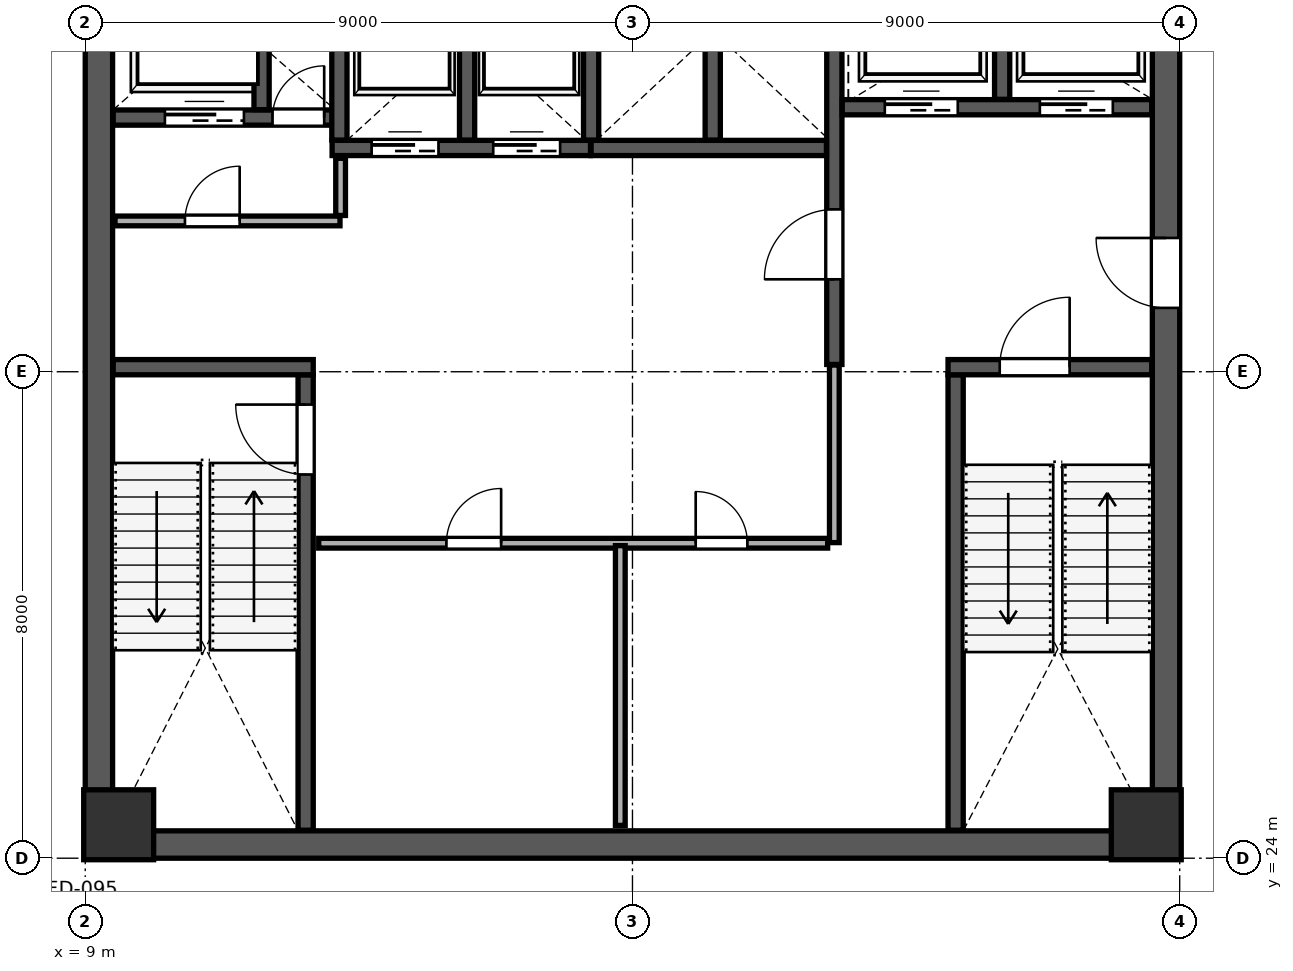
"""IFC4 building model, lengths in metres.
Left out: names, types, materials, properties, quantities, classifications, styles, units other than length and angle.
Written with IfcOpenShell. Run it as: python <this file> out.ifc"""

import sys

from ifc_helpers import new_model, si_unit, direction, frame, frame_2d, origin, origin_2d, place, context, subcontext, project, spatial, rectangle, extrude, source, transform, mapped, element, fill, save


model = new_model("IFC4")
c1 = context("Model", 3, precision=1e-05, world=origin(), true_north=direction((0.0, 1.0)))
c2 = subcontext(c1, "Body", "Model", "MODEL_VIEW")
j1 = project(units=[si_unit("LENGTHUNIT", "METRE"), si_unit("PLANEANGLEUNIT", "RADIAN")], contexts=[c1])
p1 = place(None, origin())
s1 = spatial("IfcSite", under=j1, at=p1, CompositionType="ELEMENT")
p2 = place(p1, origin())
s2 = spatial("IfcBuilding", under=s1, at=p2, CompositionType="ELEMENT")
p3 = place(p2, frame((0.0, 0.0, 162.4)))
s3 = spatial("IfcBuildingStorey", under=s2, at=p3, CompositionType="ELEMENT", Elevation=162.4)
m1 = source(origin(), c2, "Body", "SweptSolid", [
    extrude(rectangle(XDim=1.15, YDim=1.15, at=origin_2d()), origin(), (0.0, 0.0, 1.0), 4.199),
])
for number, where, z_axis, x_axis in (
    (1, (9.55, 24.55, 0.001), (0.0, 0.0, 1.0), (1.0, 0.0, 0.0)),
    (2, (26.45, 24.55, 0.001), (0.0, 0.0, 1.0), (1.0, 0.0, 0.0)),
):
    element("IfcColumn", number, at=place(p3, frame(where, z_axis=z_axis, x_axis=x_axis)), inside=s3, PredefinedType="COLUMN", context=c2, shape_type="MappedRepresentation", body=[
        mapped(m1, transform((0.0, 0.0, 0.0), scale=1.0)),
    ])
p4 = place(p3, frame((9.225, 24.45, 0.0), z_axis=(0.0, 0.0, 1.0), x_axis=(0.0, 1.0, 0.0)))
e3 = element("IfcWall", 3, at=p4, inside=s3, PredefinedType="SHEAR", context=c2, shape_type="SweptSolid", body=[
    extrude(rectangle(XDim=15.1, YDim=0.45, at=frame_2d((7.55, 0.0))), origin(), (0.0, 0.0, 1.0), 3.96),
])
p5 = place(p3, frame((26.775, 24.45, 0.0), z_axis=(0.0, 0.0, 1.0), x_axis=(0.0, 1.0, 0.0)))
e4 = element("IfcWall", 4, at=p5, inside=s3, PredefinedType="SHEAR", context=c2, shape_type="SweptSolid", body=[
    extrude(rectangle(XDim=15.1, YDim=0.45, at=frame_2d((7.55, 0.0))), origin(), (0.0, 0.0, 1.0), 3.96),
])
p6 = place(p5, frame((8.6, 0.0, 0.0)))
e5 = element("IfcOpeningElement", 5, at=p6, cuts=e4, PredefinedType="OPENING", context=c2, shape_type="SweptSolid", body=[
    extrude(rectangle(XDim=1.15, YDim=2.2, at=frame_2d((0.575, 1.1))), frame((0.0, 0.235, 0.0), z_axis=(0.0, -1.0, 0.0), x_axis=(1.0, 0.0, 0.0)), (0.0, 0.0, 1.0), 0.47),
])
p7 = place(p3, frame((9.0, 24.225, 0.0), z_axis=(0.0, 0.0, 1.0), x_axis=(1.0, 0.0, 0.0)))
e6 = element("IfcWall", 6, at=p7, inside=s3, PredefinedType="SHEAR", context=c2, shape_type="SweptSolid", body=[
    extrude(rectangle(XDim=18.0, YDim=0.45, at=frame_2d((9.0, 0.0))), origin(), (0.0, 0.0, 1.0), 3.96),
])
p8 = place(p3, frame((12.625, 24.46, 0.0), z_axis=(0.0, 0.0, 1.0), x_axis=(0.0, 1.0, 0.0)))
e7 = element("IfcWall", 7, at=p8, inside=s3, PredefinedType="SHEAR", context=c2, shape_type="SweptSolid", body=[
    extrude(rectangle(XDim=7.49, YDim=0.25, at=frame_2d((3.745, 0.0))), origin(), (0.0, 0.0, 1.0), 3.96),
])
p9 = place(p8, frame((5.85, 0.0, 0.0)))
e8 = element("IfcOpeningElement", 8, at=p9, cuts=e7, PredefinedType="OPENING", context=c2, shape_type="SweptSolid", body=[
    extrude(rectangle(XDim=1.15, YDim=2.2, at=frame_2d((0.575, 1.1))), frame((0.0, 0.135, 0.0), z_axis=(0.0, -1.0, 0.0), x_axis=(1.0, 0.0, 0.0)), (0.0, 0.0, 1.0), 0.27),
])
p10 = place(p3, frame((9.46, 32.075, 0.0), z_axis=(0.0, 0.0, 1.0), x_axis=(1.0, 0.0, 0.0)))
e9 = element("IfcWall", 9, at=p10, inside=s3, PredefinedType="SHEAR", context=c2, shape_type="SweptSolid", body=[
    extrude(rectangle(XDim=3.29, YDim=0.25, at=frame_2d((1.645, 0.0))), origin(), (0.0, 0.0, 1.0), 3.96),
])
p11 = place(p3, frame((23.315, 24.46, 0.0), z_axis=(0.0, 0.0, 1.0), x_axis=(0.0, 1.0, 0.0)))
e10 = element("IfcWall", 10, at=p11, inside=s3, PredefinedType="SHEAR", context=c2, shape_type="SweptSolid", body=[
    extrude(rectangle(XDim=7.49, YDim=0.25, at=frame_2d((3.745, 0.0))), origin(), (0.0, 0.0, 1.0), 3.96),
])
p12 = place(p3, frame((23.19, 32.075, 0.0), z_axis=(0.0, 0.0, 1.0), x_axis=(1.0, 0.0, 0.0)))
e11 = element("IfcWall", 11, at=p12, inside=s3, PredefinedType="SHEAR", context=c2, shape_type="SweptSolid", body=[
    extrude(rectangle(XDim=3.35, YDim=0.25, at=frame_2d((1.675, 0.0))), origin(), (0.0, 0.0, 1.0), 3.96),
])
p13 = place(p12, frame((0.85, 0.0, 0.0)))
e12 = element("IfcOpeningElement", 12, at=p13, cuts=e11, PredefinedType="OPENING", context=c2, shape_type="SweptSolid", body=[
    extrude(rectangle(XDim=1.15, YDim=2.2, at=frame_2d((0.575, 1.1))), frame((0.0, 0.135, 0.0), z_axis=(0.0, -1.0, 0.0), x_axis=(1.0, 0.0, 0.0)), (0.0, 0.0, 1.0), 0.27),
])
p14 = place(p3, frame((21.32, 32.12, 0.0), z_axis=(0.0, 0.0, 1.0), x_axis=(0.0, 1.0, 0.0)))
e13 = element("IfcWall", 13, at=p14, inside=s3, PredefinedType="SHEAR", context=c2, shape_type="SweptSolid", body=[
    extrude(rectangle(XDim=7.42, YDim=0.25, at=frame_2d((3.71, 0.0))), origin(), (0.0, 0.0, 1.0), 3.96),
])
p15 = place(p14, frame((1.4, 0.0, 0.0)))
e14 = element("IfcOpeningElement", 14, at=p15, cuts=e13, PredefinedType="OPENING", context=c2, shape_type="SweptSolid", body=[
    extrude(rectangle(XDim=1.15, YDim=2.2, at=frame_2d((0.575, 1.1))), frame((0.0, 0.135, 0.0), z_axis=(0.0, -1.0, 0.0), x_axis=(1.0, 0.0, 0.0)), (0.0, 0.0, 1.0), 0.27),
])
p16 = place(p3, frame((9.46, 36.18, 0.0), z_axis=(0.0, 0.0, 1.0), x_axis=(1.0, 0.0, 0.0)))
e15 = element("IfcWall", 15, at=p16, inside=s3, PredefinedType="SHEAR", context=c2, shape_type="SweptSolid", body=[
    extrude(rectangle(XDim=3.79, YDim=0.25, at=frame_2d((1.895, 0.0))), origin(), (0.0, 0.0, 1.0), 3.96),
])
p17 = place(p16, frame((2.62, 0.0, 0.0)))
e16 = element("IfcOpeningElement", 16, at=p17, cuts=e15, PredefinedType="OPENING", context=c2, shape_type="SweptSolid", body=[
    extrude(rectangle(XDim=0.85, YDim=2.1, at=frame_2d((0.425, 1.05))), frame((0.0, 0.135, 0.0), z_axis=(0.0, -1.0, 0.0), x_axis=(1.0, 0.0, 0.0)), (0.0, 0.0, 1.0), 0.27),
])
p18 = place(p16, frame((0.85, 0.0, 0.0)))
e17 = element("IfcOpeningElement", 17, at=p18, cuts=e15, PredefinedType="OPENING", context=c2, shape_type="SweptSolid", body=[
    extrude(rectangle(XDim=1.3, YDim=2.25, at=frame_2d((0.65, 1.125))), frame((0.0, 0.135, 0.0), z_axis=(0.0, -1.0, 0.0), x_axis=(1.0, 0.0, 0.0)), (0.0, 0.0, 1.0), 0.27),
])
p19 = place(p3, frame((11.9, 36.31, 0.0), z_axis=(0.0, 0.0, 1.0), x_axis=(0.0, 1.0, 0.0)))
e18 = element("IfcWall", 18, at=p19, inside=s3, PredefinedType="SHEAR", context=c2, shape_type="SweptSolid", body=[
    extrude(rectangle(XDim=3.23, YDim=0.25, at=frame_2d((1.615, 0.0))), origin(), (0.0, 0.0, 1.0), 3.96),
])
p20 = place(p3, frame((21.45, 36.35, 0.0), z_axis=(0.0, 0.0, 1.0), x_axis=(1.0, 0.0, 0.0)))
e19 = element("IfcWall", 19, at=p20, inside=s3, PredefinedType="SHEAR", context=c2, shape_type="SweptSolid", body=[
    extrude(rectangle(XDim=5.09, YDim=0.25, at=frame_2d((2.545, 0.0))), origin(), (0.0, 0.0, 1.0), 3.96),
])
p21 = place(p20, frame((0.7, 0.0, 0.0)))
e20 = element("IfcOpeningElement", 20, at=p21, cuts=e19, PredefinedType="OPENING", context=c2, shape_type="SweptSolid", body=[
    extrude(rectangle(XDim=1.2, YDim=2.2, at=frame_2d((0.6, 1.1))), frame((0.0, 0.135, 0.0), z_axis=(0.0, -1.0, 0.0), x_axis=(1.0, 0.0, 0.0)), (0.0, 0.0, 1.0), 0.27),
])
p22 = place(p20, frame((3.25, 0.0, 0.0)))
e21 = element("IfcOpeningElement", 21, at=p22, cuts=e19, PredefinedType="OPENING", context=c2, shape_type="SweptSolid", body=[
    extrude(rectangle(XDim=1.2, YDim=2.2, at=frame_2d((0.6, 1.1))), frame((0.0, 0.135, 0.0), z_axis=(0.0, -1.0, 0.0), x_axis=(1.0, 0.0, 0.0)), (0.0, 0.0, 1.0), 0.27),
])
p23 = place(p3, frame((24.08, 36.48, 0.0), z_axis=(0.0, 0.0, 1.0), x_axis=(0.0, 1.0, 0.0)))
e22 = element("IfcWall", 22, at=p23, inside=s3, PredefinedType="SHEAR", context=c2, shape_type="SweptSolid", body=[
    extrude(rectangle(XDim=3.06, YDim=0.25, at=frame_2d((1.53, 0.0))), origin(), (0.0, 0.0, 1.0), 3.96),
])
p24 = place(p3, frame((13.06, 35.68, 0.0), z_axis=(0.0, 0.0, 1.0), x_axis=(1.0, 0.0, 0.0)))
e23 = element("IfcWall", 23, at=p24, inside=s3, PredefinedType="SHEAR", context=c2, shape_type="SweptSolid", body=[
    extrude(rectangle(XDim=4.25, YDim=0.25, at=frame_2d((2.125, 0.0))), origin(), (0.0, 0.0, 1.0), 3.96),
])
p25 = place(p24, frame((0.65, 0.0, 0.0)))
e24 = element("IfcOpeningElement", 24, at=p25, cuts=e23, PredefinedType="OPENING", context=c2, shape_type="SweptSolid", body=[
    extrude(rectangle(XDim=1.1, YDim=2.2, at=frame_2d((0.55, 1.1))), frame((0.0, 0.135, 0.0), z_axis=(0.0, -1.0, 0.0), x_axis=(1.0, 0.0, 0.0)), (0.0, 0.0, 1.0), 0.27),
])
p26 = place(p24, frame((2.65, 0.0, 0.0)))
e25 = element("IfcOpeningElement", 25, at=p26, cuts=e23, PredefinedType="OPENING", context=c2, shape_type="SweptSolid", body=[
    extrude(rectangle(XDim=1.1, YDim=2.2, at=frame_2d((0.55, 1.1))), frame((0.0, 0.135, 0.0), z_axis=(0.0, -1.0, 0.0), x_axis=(1.0, 0.0, 0.0)), (0.0, 0.0, 1.0), 0.27),
])
for number, where, z_axis, x_axis in (
    (26, (13.18, 35.81, 0.0), (0.0, 0.0, 1.0), (0.0, 1.0, 0.0)),
    (27, (15.28, 35.81, 0.0), (0.0, 0.0, 1.0), (0.0, 1.0, 0.0)),
):
    element("IfcWall", number, at=place(p3, frame(where, z_axis=z_axis, x_axis=x_axis)), inside=s3, PredefinedType="SHEAR", context=c2, shape_type="SweptSolid", body=[
        extrude(rectangle(XDim=3.73, YDim=0.25, at=frame_2d((1.865, 0.0))), origin(), (0.0, 0.0, 1.0), 3.96),
    ])
p27 = place(p3, frame((17.32, 35.68, 0.0), z_axis=(0.0, 0.0, 1.0), x_axis=(1.0, 0.0, 0.0)))
e28 = element("IfcWall", 28, at=p27, inside=s3, PredefinedType="SHEAR", context=c2, shape_type="SweptSolid", body=[
    extrude(rectangle(XDim=3.87, YDim=0.25, at=frame_2d((1.935, 0.0))), origin(), (0.0, 0.0, 1.0), 3.96),
])
for number, where, z_axis, x_axis in (
    (29, (17.32, 35.81, 0.0), (0.0, 0.0, 1.0), (0.0, 1.0, 0.0)),
    (30, (19.32, 35.81, 0.0), (0.0, 0.0, 1.0), (0.0, 1.0, 0.0)),
):
    element("IfcWall", number, at=place(p3, frame(where, z_axis=z_axis, x_axis=x_axis)), inside=s3, PredefinedType="SHEAR", context=c2, shape_type="SweptSolid", body=[
        extrude(rectangle(XDim=3.73, YDim=0.25, at=frame_2d((1.865, 0.0))), origin(), (0.0, 0.0, 1.0), 3.96),
    ])
p28 = place(p3, frame((9.49, 34.48, 0.0), z_axis=(0.0, 0.0, 1.0), x_axis=(1.0, 0.0, 0.0)))
e31 = element("IfcWall", 31, at=p28, inside=s3, PredefinedType="PARTITIONING", context=c2, shape_type="SweptSolid", body=[
    extrude(rectangle(XDim=3.7, YDim=0.16, at=frame_2d((1.85, 0.0))), origin(), (0.0, 0.0, 1.0), 3.96),
])
p29 = place(p28, frame((1.15, 0.0, 0.0)))
e32 = element("IfcOpeningElement", 32, at=p29, cuts=e31, PredefinedType="OPENING", context=c2, shape_type="SweptSolid", body=[
    extrude(rectangle(XDim=0.9, YDim=2.15, at=frame_2d((0.45, 1.075))), frame((0.0, 0.09, 0.0), z_axis=(0.0, -1.0, 0.0), x_axis=(1.0, 0.0, 0.0)), (0.0, 0.0, 1.0), 0.18),
])
p30 = place(p3, frame((13.2, 34.57, 0.0), z_axis=(0.0, 0.0, 1.0), x_axis=(0.0, 1.0, 0.0)))
e33 = element("IfcWall", 33, at=p30, inside=s3, PredefinedType="PARTITIONING", context=c2, shape_type="SweptSolid", body=[
    extrude(rectangle(XDim=0.94, YDim=0.16, at=frame_2d((0.47, 0.0))), origin(), (0.0, 0.0, 1.0), 3.96),
])
p31 = place(p3, frame((12.84, 29.18, 0.0), z_axis=(0.0, 0.0, 1.0), x_axis=(1.0, 0.0, 0.0)))
e34 = element("IfcWall", 34, at=p31, inside=s3, PredefinedType="PARTITIONING", context=c2, shape_type="SweptSolid", body=[
    extrude(rectangle(XDim=8.37, YDim=0.16, at=frame_2d((4.185, 0.0))), origin(), (0.0, 0.0, 1.0), 3.96),
])
p32 = place(p31, frame((2.1, 0.0, 0.0)))
e35 = element("IfcOpeningElement", 35, at=p32, cuts=e34, PredefinedType="OPENING", context=c2, shape_type="SweptSolid", body=[
    extrude(rectangle(XDim=0.9, YDim=2.15, at=frame_2d((0.45, 1.075))), frame((0.0, 0.09, 0.0), z_axis=(0.0, -1.0, 0.0), x_axis=(1.0, 0.0, 0.0)), (0.0, 0.0, 1.0), 0.18),
])
p33 = place(p31, frame((6.2, 0.0, 0.0)))
e36 = element("IfcOpeningElement", 36, at=p33, cuts=e34, PredefinedType="OPENING", context=c2, shape_type="SweptSolid", body=[
    extrude(rectangle(XDim=0.85, YDim=2.1, at=frame_2d((0.425, 1.05))), frame((0.0, 0.09, 0.0), z_axis=(0.0, -1.0, 0.0), x_axis=(1.0, 0.0, 0.0)), (0.0, 0.0, 1.0), 0.18),
])
p34 = place(p3, frame((17.8, 24.54, 0.0), z_axis=(0.0, 0.0, 1.0), x_axis=(0.0, 1.0, 0.0)))
e37 = element("IfcWall", 37, at=p34, inside=s3, PredefinedType="PARTITIONING", context=c2, shape_type="SweptSolid", body=[
    extrude(rectangle(XDim=4.6, YDim=0.16, at=frame_2d((2.3, 0.0))), origin(), (0.0, 0.0, 1.0), 3.96),
])
p35 = place(p3, frame((21.32, 29.19, 0.0), z_axis=(0.0, 0.0, 1.0), x_axis=(0.0, 1.0, 0.0)))
e38 = element("IfcWall", 38, at=p35, inside=s3, PredefinedType="PARTITIONING", context=c2, shape_type="SweptSolid", body=[
    extrude(rectangle(XDim=2.92, YDim=0.16, at=frame_2d((1.46, 0.0))), origin(), (0.0, 0.0, 1.0), 3.96),
])
p36 = place(p3, frame((7.213, 23.391, 0.0), z_axis=(0.0, 0.0, 1.0), x_axis=(0.906304602938, -0.422625089996, 0.0)))
e39 = element("IfcWall", 39, at=p36, inside=s3, PredefinedType="PARTITIONING", context=c2, shape_type="SweptSolid", body=[
    extrude(rectangle(XDim=19.61, YDim=0.16, at=frame_2d((9.805, 0.0))), origin(), (0.0, 0.0, 1.0), 3.96),
])
p37 = place(p36, frame((1.45, 0.0, 0.0)))
e40 = element("IfcOpeningElement", 40, at=p37, cuts=e39, PredefinedType="OPENING", context=c2, shape_type="SweptSolid", body=[
    extrude(rectangle(XDim=0.95, YDim=2.15, at=frame_2d((0.475, 1.075))), frame((0.0, 0.09, 0.0), z_axis=(0.0, -1.0, 0.0), x_axis=(1.0, 0.0, 0.0)), (0.0, 0.0, 1.0), 0.18),
])
p38 = place(p36, frame((8.7, 0.0, 0.0)))
e41 = element("IfcOpeningElement", 41, at=p38, cuts=e39, PredefinedType="OPENING", context=c2, shape_type="SweptSolid", body=[
    extrude(rectangle(XDim=0.95, YDim=2.15, at=frame_2d((0.475, 1.075))), frame((0.0, 0.09, 0.0), z_axis=(0.0, -1.0, 0.0), x_axis=(1.0, 0.0, 0.0)), (0.0, 0.0, 1.0), 0.18),
])
p39 = place(p3, frame((1.756, 27.635, 0.0), z_axis=(0.0, 0.0, 1.0), x_axis=(0.422615732035, 0.906308966653, 0.0)))
e42 = element("IfcWall", 42, at=p39, inside=s3, PredefinedType="PARTITIONING", context=c2, shape_type="SweptSolid", body=[
    extrude(rectangle(XDim=23.34, YDim=0.135, at=frame_2d((11.67, 0.0))), origin(), (0.0, 0.0, 1.0), 3.96),
])
p40 = place(p39, frame((1.7, 0.0, 0.0)))
e43 = element("IfcOpeningElement", 43, at=p40, cuts=e42, PredefinedType="OPENING", context=c2, shape_type="SweptSolid", body=[
    extrude(rectangle(XDim=0.95, YDim=2.15, at=frame_2d((0.475, 1.075))), frame((0.0, 0.078, 0.0), z_axis=(0.0, -1.0, 0.0), x_axis=(1.0, 0.0, 0.0)), (0.0, 0.0, 1.0), 0.155),
])
p41 = place(p39, frame((9.8, 0.0, 0.0)))
e44 = element("IfcOpeningElement", 44, at=p41, cuts=e42, PredefinedType="OPENING", context=c2, shape_type="SweptSolid", body=[
    extrude(rectangle(XDim=0.95, YDim=2.15, at=frame_2d((0.475, 1.075))), frame((0.0, 0.078, 0.0), z_axis=(0.0, -1.0, 0.0), x_axis=(1.0, 0.0, 0.0)), (0.0, 0.0, 1.0), 0.155),
])
p42 = place(p3, frame((23.256, 11.299, 0.0), z_axis=(0.0, 0.0, 1.0), x_axis=(0.422623489462, 0.906305349292, 0.0)))
e45 = element("IfcWall", 45, at=p42, inside=s3, PredefinedType="PARTITIONING", context=c2, shape_type="SweptSolid", body=[
    extrude(rectangle(XDim=21.48, YDim=0.16, at=frame_2d((10.74, 0.0))), origin(), (0.0, 0.0, 1.0), 3.96),
])
m2 = source(origin(), c2, "Body", "SweptSolid", [
    extrude(rectangle(XDim=1.15, YDim=2.2, at=frame_2d((0.575, 1.1))), frame((0.0, 0.025, 0.0), z_axis=(0.0, -1.0, 0.0), x_axis=(1.0, 0.0, 0.0)), (0.0, 0.0, 1.0), 0.05),
])
p43 = place(p9, origin())
e46 = element("IfcDoor", 46, at=p43, inside=s3, OperationType="SINGLE_SWING_RIGHT", PredefinedType="DOOR", context=c2, shape_type="MappedRepresentation", body=[
    mapped(m2, transform((0.0, 0.0, 0.0), scale=1.0)),
])
fill(e8, e46)
m3 = source(origin(), c2, "Body", "SweptSolid", [
    extrude(rectangle(XDim=1.15, YDim=2.2, at=frame_2d((0.575, 1.1))), frame((0.0, 0.025, 0.0), z_axis=(0.0, -1.0, 0.0), x_axis=(1.0, 0.0, 0.0)), (0.0, 0.0, 1.0), 0.05),
])
p44 = place(p15, origin())
e47 = element("IfcDoor", 47, at=p44, inside=s3, OperationType="SINGLE_SWING_LEFT", PredefinedType="DOOR", context=c2, shape_type="MappedRepresentation", body=[
    mapped(m3, transform((0.0, 0.0, 0.0), scale=1.0)),
])
fill(e14, e47)
p45 = place(p13, origin())
e48 = element("IfcDoor", 48, at=p45, inside=s3, OperationType="SINGLE_SWING_RIGHT", PredefinedType="DOOR", context=c2, shape_type="MappedRepresentation", body=[
    mapped(m2, transform((0.0, 0.0, 0.0), scale=1.0)),
])
fill(e12, e48)
p46 = place(p6, origin())
e49 = element("IfcDoor", 49, at=p46, inside=s3, OperationType="SINGLE_SWING_RIGHT", PredefinedType="DOOR", context=c2, shape_type="MappedRepresentation", body=[
    mapped(m3, transform((0.0, 0.0, 0.0), scale=1.0)),
])
fill(e5, e49)
m4 = source(origin(), c2, "Body", "SweptSolid", [
    extrude(rectangle(XDim=0.85, YDim=2.1, at=frame_2d((0.425, 1.05))), frame((0.0, 0.025, 0.0), z_axis=(0.0, -1.0, 0.0), x_axis=(1.0, 0.0, 0.0)), (0.0, 0.0, 1.0), 0.05),
])
p47 = place(p17, origin())
e50 = element("IfcDoor", 50, at=p47, inside=s3, OperationType="SINGLE_SWING_RIGHT", PredefinedType="DOOR", context=c2, shape_type="MappedRepresentation", body=[
    mapped(m4, transform((0.0, 0.0, 0.0), scale=1.0)),
])
fill(e16, e50)
m5 = source(origin(), c2, "Body", "SweptSolid", [
    extrude(rectangle(XDim=1.1, YDim=2.2, at=frame_2d((0.55, 1.1))), frame((0.0, 0.025, 0.0), z_axis=(0.0, -1.0, 0.0), x_axis=(1.0, 0.0, 0.0)), (0.0, 0.0, 1.0), 0.05),
])
p48 = place(p25, origin())
e51 = element("IfcDoor", 51, at=p48, inside=s3, OperationType="SLIDING_TO_LEFT", PredefinedType="DOOR", context=c2, shape_type="MappedRepresentation", body=[
    mapped(m5, transform((0.0, 0.0, 0.0), scale=1.0)),
])
fill(e24, e51)
p49 = place(p26, origin())
e52 = element("IfcDoor", 52, at=p49, inside=s3, OperationType="SLIDING_TO_RIGHT", PredefinedType="DOOR", context=c2, shape_type="MappedRepresentation", body=[
    mapped(m5, transform((0.0, 0.0, 0.0), scale=1.0)),
])
fill(e25, e52)
m6 = source(origin(), c2, "Body", "SweptSolid", [
    extrude(rectangle(XDim=1.2, YDim=2.2, at=frame_2d((0.6, 1.1))), frame((0.0, 0.025, 0.0), z_axis=(0.0, -1.0, 0.0), x_axis=(1.0, 0.0, 0.0)), (0.0, 0.0, 1.0), 0.05),
])
p50 = place(p21, origin())
e53 = element("IfcDoor", 53, at=p50, inside=s3, OperationType="SLIDING_TO_LEFT", PredefinedType="DOOR", context=c2, shape_type="MappedRepresentation", body=[
    mapped(m6, transform((0.0, 0.0, 0.0), scale=1.0)),
])
fill(e20, e53)
p51 = place(p22, origin())
e54 = element("IfcDoor", 54, at=p51, inside=s3, OperationType="SLIDING_TO_RIGHT", PredefinedType="DOOR", context=c2, shape_type="MappedRepresentation", body=[
    mapped(m6, transform((0.0, 0.0, 0.0), scale=1.0)),
])
fill(e21, e54)
m7 = source(origin(), c2, "Body", "SweptSolid", [
    extrude(rectangle(XDim=1.3, YDim=2.25, at=frame_2d((0.65, 1.125))), frame((0.0, 0.025, 0.0), z_axis=(0.0, -1.0, 0.0), x_axis=(1.0, 0.0, 0.0)), (0.0, 0.0, 1.0), 0.05),
])
p52 = place(p18, origin())
e55 = element("IfcDoor", 55, at=p52, inside=s3, OperationType="SLIDING_TO_LEFT", PredefinedType="DOOR", context=c2, shape_type="MappedRepresentation", body=[
    mapped(m7, transform((0.0, 0.0, 0.0), scale=1.0)),
])
fill(e17, e55)
m8 = source(origin(), c2, "Body", "SweptSolid", [
    extrude(rectangle(XDim=0.9, YDim=2.15, at=frame_2d((0.45, 1.075))), frame((0.0, 0.025, 0.0), z_axis=(0.0, -1.0, 0.0), x_axis=(1.0, 0.0, 0.0)), (0.0, 0.0, 1.0), 0.05),
])
p53 = place(p29, origin())
e56 = element("IfcDoor", 56, at=p53, inside=s3, OperationType="SINGLE_SWING_RIGHT", PredefinedType="DOOR", context=c2, shape_type="MappedRepresentation", body=[
    mapped(m8, transform((0.0, 0.0, 0.0), scale=1.0)),
])
fill(e32, e56)
p54 = place(p32, origin())
e57 = element("IfcDoor", 57, at=p54, inside=s3, OperationType="SINGLE_SWING_RIGHT", PredefinedType="DOOR", context=c2, shape_type="MappedRepresentation", body=[
    mapped(m8, transform((0.0, 0.0, 0.0), scale=1.0)),
])
fill(e35, e57)
p55 = place(p33, origin())
e58 = element("IfcDoor", 58, at=p55, inside=s3, OperationType="SINGLE_SWING_LEFT", PredefinedType="DOOR", context=c2, shape_type="MappedRepresentation", body=[
    mapped(m4, transform((0.0, 0.0, 0.0), scale=1.0)),
])
fill(e36, e58)
save(model, sys.argv[1])
